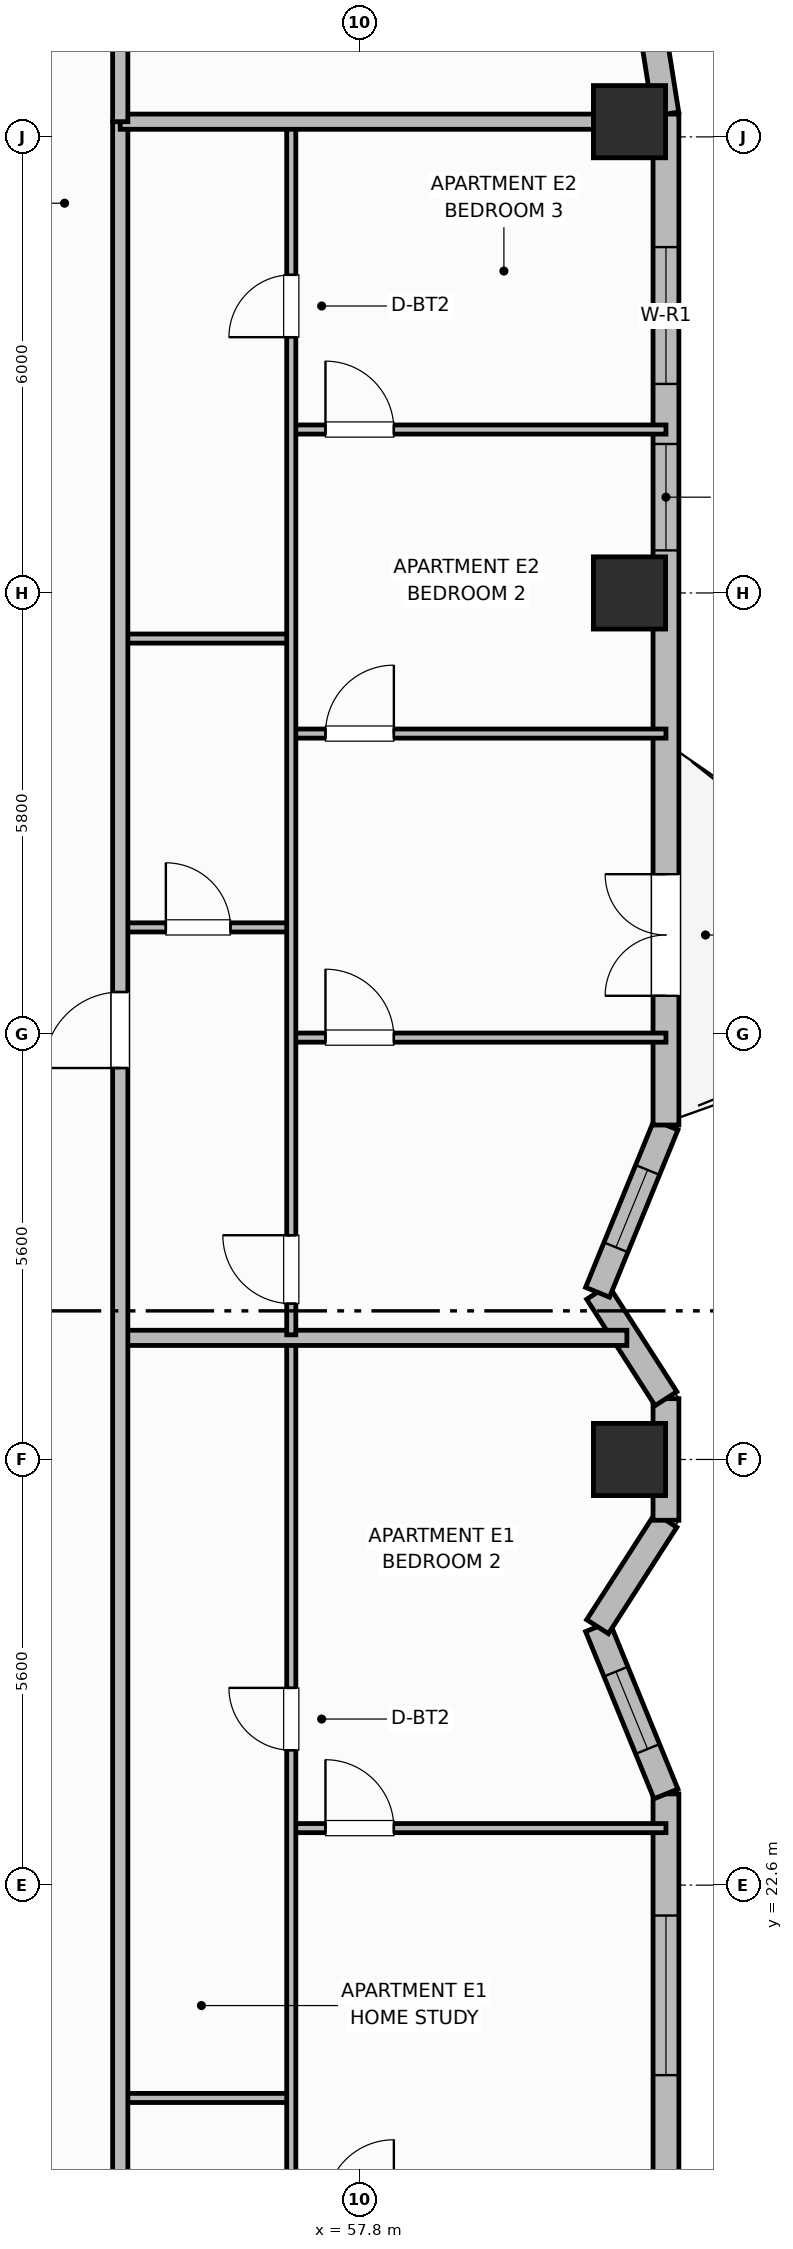
"""IFC4 building model, lengths in metres.
Left out: names, types, materials, properties, quantities, classifications, styles, units other than length and angle.
Written with IfcOpenShell. Run it as: python <this file> out.ifc"""

import sys

from ifc_helpers import new_model, si_unit, direction, frame, frame_2d, origin, origin_2d, place, context, subcontext, project, spatial, rectangle, extrude, element, fill, save


model = new_model("IFC4")
c1 = context("Model", 3, precision=1e-05, world=origin(), true_north=direction((0.0, 1.0)))
c2 = subcontext(c1, "Body", "Model", "MODEL_VIEW")
j1 = project(units=[si_unit("LENGTHUNIT", "METRE"), si_unit("PLANEANGLEUNIT", "RADIAN")], contexts=[c1])
p1 = place(None, origin())
s1 = spatial("IfcSite", under=j1, at=p1, CompositionType="ELEMENT")
p2 = place(p1, origin())
s2 = spatial("IfcBuilding", under=s1, at=p2, CompositionType="ELEMENT")
p3 = place(p2, frame((0.0, 0.0, 155.2)))
s3 = spatial("IfcBuildingStorey", under=s2, at=p3, CompositionType="ELEMENT", Elevation=155.2)
for number, where, z_axis, x_axis in (
    (1, (61.35, 28.2, 0.0), (0.0, 0.0, 1.0), (1.0, 0.0, 0.0)),
    (2, (61.35, 39.6, 0.0), (0.0, 0.0, 1.0), (1.0, 0.0, 0.0)),
    (3, (61.35, 45.8, 0.0), (0.0, 0.0, 1.0), (1.0, 0.0, 0.0)),
):
    element("IfcColumn", number, at=place(p3, frame(where, z_axis=z_axis, x_axis=x_axis)), inside=s3, PredefinedType="COLUMN", context=c2, shape_type="SweptSolid", body=[
        extrude(rectangle(XDim=0.95, YDim=0.95, at=origin_2d()), origin(), (0.0, 0.0, 1.0), 3.7),
    ])
p4 = place(p3, frame((61.83, 10.5, 0.0), z_axis=(0.0, 0.0, 1.0), x_axis=(0.0, 1.0, 0.0)))
e4 = element("IfcWall", 4, at=p4, inside=s3, PredefinedType="SOLIDWALL", context=c2, shape_type="SweptSolid", body=[
    extrude(rectangle(XDim=13.3, YDim=0.34, at=frame_2d((6.65, 0.0))), origin(), (0.0, 0.0, 1.0), 2.72),
])
p5 = place(p4, frame((1.6, 0.0, 0.7)))
e5 = element("IfcOpeningElement", 5, at=p5, cuts=e4, PredefinedType="OPENING", context=c2, shape_type="SweptSolid", body=[
    extrude(rectangle(XDim=2.1, YDim=1.9, at=frame_2d((1.05, 0.95))), frame((0.0, 0.18, 0.0), z_axis=(0.0, -1.0, 0.0), x_axis=(1.0, 0.0, 0.0)), (0.0, 0.0, 1.0), 0.36),
])
p6 = place(p4, frame((9.6, 0.0, 0.7)))
e6 = element("IfcOpeningElement", 6, at=p6, cuts=e4, PredefinedType="OPENING", context=c2, shape_type="SweptSolid", body=[
    extrude(rectangle(XDim=2.1, YDim=1.9, at=frame_2d((1.05, 0.95))), frame((0.0, 0.18, 0.0), z_axis=(0.0, -1.0, 0.0), x_axis=(1.0, 0.0, 0.0)), (0.0, 0.0, 1.0), 0.36),
])
p7 = place(p3, frame((61.83, 23.8, 0.0), z_axis=(0.0, 0.0, 1.0), x_axis=(-0.378692835005, 0.925522412865, 0.0)))
e7 = element("IfcWall", 7, at=p7, inside=s3, PredefinedType="SOLIDWALL", context=c2, shape_type="SweptSolid", body=[
    extrude(rectangle(XDim=2.377, YDim=0.34, at=frame_2d((1.188, 0.0))), origin(), (0.0, 0.0, 1.0), 2.72),
])
p8 = place(p7, frame((0.638, 0.0, 0.91)))
e8 = element("IfcOpeningElement", 8, at=p8, cuts=e7, PredefinedType="OPENING", context=c2, shape_type="SweptSolid", body=[
    extrude(rectangle(XDim=1.1, YDim=1.65, at=frame_2d((0.55, 0.825))), frame((0.0, 0.18, 0.0), z_axis=(0.0, -1.0, 0.0), x_axis=(1.0, 0.0, 0.0)), (0.0, 0.0, 1.0), 0.36),
])
p9 = place(p3, frame((60.93, 26.0, 0.0), z_axis=(0.0, 0.0, 1.0), x_axis=(0.540846555596, 0.841121277403, 0.0)))
e9 = element("IfcWall", 9, at=p9, inside=s3, PredefinedType="SOLIDWALL", context=c2, shape_type="SweptSolid", body=[
    extrude(rectangle(XDim=1.664, YDim=0.34, at=frame_2d((0.832, 0.0))), origin(), (0.0, 0.0, 1.0), 2.72),
])
p10 = place(p3, frame((61.83, 27.4, 0.0), z_axis=(0.0, 0.0, 1.0), x_axis=(0.0, 1.0, 0.0)))
e10 = element("IfcWall", 10, at=p10, inside=s3, PredefinedType="SOLIDWALL", context=c2, shape_type="SweptSolid", body=[
    extrude(rectangle(XDim=1.6, YDim=0.34, at=frame_2d((0.8, 0.0))), origin(), (0.0, 0.0, 1.0), 2.72),
])
p11 = place(p3, frame((61.83, 29.0, 0.0), z_axis=(0.0, 0.0, 1.0), x_axis=(-0.540846555596, 0.841121277403, 0.0)))
e11 = element("IfcWall", 11, at=p11, inside=s3, PredefinedType="SOLIDWALL", context=c2, shape_type="SweptSolid", body=[
    extrude(rectangle(XDim=1.664, YDim=0.34, at=frame_2d((0.832, 0.0))), origin(), (0.0, 0.0, 1.0), 2.72),
])
p12 = place(p3, frame((60.93, 30.4, 0.0), z_axis=(0.0, 0.0, 1.0), x_axis=(0.378656839344, 0.925537140269, 0.0)))
e12 = element("IfcWall", 12, at=p12, inside=s3, PredefinedType="SOLIDWALL", context=c2, shape_type="SweptSolid", body=[
    extrude(rectangle(XDim=2.377, YDim=0.34, at=frame_2d((1.188, 0.0))), origin(), (0.0, 0.0, 1.0), 2.72),
])
p13 = place(p12, frame((0.638, 0.0, 0.91)))
e13 = element("IfcOpeningElement", 13, at=p13, cuts=e12, PredefinedType="OPENING", context=c2, shape_type="SweptSolid", body=[
    extrude(rectangle(XDim=1.1, YDim=1.65, at=frame_2d((0.55, 0.825))), frame((0.0, 0.18, 0.0), z_axis=(0.0, -1.0, 0.0), x_axis=(1.0, 0.0, 0.0)), (0.0, 0.0, 1.0), 0.36),
])
p14 = place(p3, frame((61.83, 32.6, 0.0), z_axis=(0.0, 0.0, 1.0), x_axis=(0.0, 1.0, 0.0)))
e14 = element("IfcWall", 14, at=p14, inside=s3, PredefinedType="SOLIDWALL", context=c2, shape_type="SweptSolid", body=[
    extrude(rectangle(XDim=13.3, YDim=0.34, at=frame_2d((6.65, 0.0))), origin(), (0.0, 0.0, 1.0), 2.72),
])
p15 = place(p14, frame((1.7, 0.0, 0.0)))
e15 = element("IfcOpeningElement", 15, at=p15, cuts=e14, PredefinedType="OPENING", context=c2, shape_type="SweptSolid", body=[
    extrude(rectangle(XDim=1.6, YDim=2.1, at=frame_2d((0.8, 1.05))), frame((0.0, 0.18, 0.0), z_axis=(0.0, -1.0, 0.0), x_axis=(1.0, 0.0, 0.0)), (0.0, 0.0, 1.0), 0.36),
])
p16 = place(p14, frame((7.56, 0.0, 0.71)))
e16 = element("IfcOpeningElement", 16, at=p16, cuts=e14, PredefinedType="OPENING", context=c2, shape_type="SweptSolid", body=[
    extrude(rectangle(XDim=1.4, YDim=1.85, at=frame_2d((0.7, 0.925))), frame((0.0, 0.18, 0.0), z_axis=(0.0, -1.0, 0.0), x_axis=(1.0, 0.0, 0.0)), (0.0, 0.0, 1.0), 0.36),
])
p17 = place(p14, frame((9.75, 0.0, 0.75)))
e17 = element("IfcOpeningElement", 17, at=p17, cuts=e14, PredefinedType="OPENING", context=c2, shape_type="SweptSolid", body=[
    extrude(rectangle(XDim=1.8, YDim=1.85, at=frame_2d((0.9, 0.925))), frame((0.0, 0.18, 0.0), z_axis=(0.0, -1.0, 0.0), x_axis=(1.0, 0.0, 0.0)), (0.0, 0.0, 1.0), 0.36),
])
p18 = place(p3, frame((61.83, 45.9, 0.0), z_axis=(0.0, 0.0, 1.0), x_axis=(-0.156481329164, 0.987680916907, 0.0)))
e18 = element("IfcWall", 18, at=p18, inside=s3, PredefinedType="SOLIDWALL", context=c2, shape_type="SweptSolid", body=[
    extrude(rectangle(XDim=1.136, YDim=0.34, at=frame_2d((0.568, 0.0))), origin(), (0.0, 0.0, 1.0), 2.72),
])
p19 = place(p3, frame((54.65, 19.8, 0.0), z_axis=(0.0, 0.0, 1.0), x_axis=(1.0, 0.0, 0.0)))
e19 = element("IfcWall", 19, at=p19, inside=s3, PredefinedType="PARTITIONING", context=c2, shape_type="SweptSolid", body=[
    extrude(rectangle(XDim=2.25, YDim=0.12, at=frame_2d((1.125, 0.0))), origin(), (0.0, 0.0, 1.0), 2.55),
])
p20 = place(p3, frame((56.9, 23.35, 0.0), z_axis=(0.0, 0.0, 1.0), x_axis=(1.0, 0.0, 0.0)))
e20 = element("IfcWall", 20, at=p20, inside=s3, PredefinedType="PARTITIONING", context=c2, shape_type="SweptSolid", body=[
    extrude(rectangle(XDim=4.93, YDim=0.12, at=frame_2d((2.465, 0.0))), origin(), (0.0, 0.0, 1.0), 2.55),
])
p21 = place(p20, frame((0.45, 0.0, 0.0)))
e21 = element("IfcOpeningElement", 21, at=p21, cuts=e20, PredefinedType="OPENING", context=c2, shape_type="SweptSolid", body=[
    extrude(rectangle(XDim=0.9, YDim=2.1, at=frame_2d((0.45, 1.05))), frame((0.0, 0.07, 0.0), z_axis=(0.0, -1.0, 0.0), x_axis=(1.0, 0.0, 0.0)), (0.0, 0.0, 1.0), 0.14),
])
p22 = place(p3, frame((56.9, 10.64, 0.0), z_axis=(0.0, 0.0, 1.0), x_axis=(0.0, 1.0, 0.0)))
e22 = element("IfcWall", 22, at=p22, inside=s3, PredefinedType="PARTITIONING", context=c2, shape_type="SweptSolid", body=[
    extrude(rectangle(XDim=19.12, YDim=0.12, at=frame_2d((9.56, 0.0))), origin(), (0.0, 0.0, 1.0), 2.55),
])
p23 = place(p22, frame((0.41, 0.0, 0.0)))
e23 = element("IfcOpeningElement", 23, at=p23, cuts=e22, PredefinedType="OPENING", context=c2, shape_type="SweptSolid", body=[
    extrude(rectangle(XDim=0.9, YDim=2.1, at=frame_2d((0.45, 1.05))), frame((0.0, 0.07, 0.0), z_axis=(0.0, -1.0, 0.0), x_axis=(1.0, 0.0, 0.0)), (0.0, 0.0, 1.0), 0.14),
])
p24 = place(p22, frame((13.735, 0.0, 0.0)))
e24 = element("IfcOpeningElement", 24, at=p24, cuts=e22, PredefinedType="OPENING", context=c2, shape_type="SweptSolid", body=[
    extrude(rectangle(XDim=0.82, YDim=2.08, at=frame_2d((0.41, 1.04))), frame((0.0, 0.07, 0.0), z_axis=(0.0, -1.0, 0.0), x_axis=(1.0, 0.0, 0.0)), (0.0, 0.0, 1.0), 0.14),
])
p25 = place(p3, frame((54.65, 29.8, 0.0), z_axis=(0.0, 0.0, 1.0), x_axis=(1.0, 0.0, 0.0)))
e25 = element("IfcWall", 25, at=p25, inside=s3, PredefinedType="PARTITIONING", context=c2, shape_type="SweptSolid", body=[
    extrude(rectangle(XDim=6.666, YDim=0.2, at=frame_2d((3.333, 0.0))), origin(), (0.0, 0.0, 1.0), 2.55),
])
p26 = place(p3, frame((54.65, 35.2, 0.0), z_axis=(0.0, 0.0, 1.0), x_axis=(1.0, 0.0, 0.0)))
e26 = element("IfcWall", 26, at=p26, inside=s3, PredefinedType="PARTITIONING", context=c2, shape_type="SweptSolid", body=[
    extrude(rectangle(XDim=2.25, YDim=0.12, at=frame_2d((1.125, 0.0))), origin(), (0.0, 0.0, 1.0), 2.55),
])
p27 = place(p26, frame((0.6, 0.0, 0.0)))
e27 = element("IfcOpeningElement", 27, at=p27, cuts=e26, PredefinedType="OPENING", context=c2, shape_type="SweptSolid", body=[
    extrude(rectangle(XDim=0.85, YDim=2.1, at=frame_2d((0.425, 1.05))), frame((0.0, 0.07, 0.0), z_axis=(0.0, -1.0, 0.0), x_axis=(1.0, 0.0, 0.0)), (0.0, 0.0, 1.0), 0.14),
])
p28 = place(p3, frame((54.65, 39.0, 0.0), z_axis=(0.0, 0.0, 1.0), x_axis=(1.0, 0.0, 0.0)))
e28 = element("IfcWall", 28, at=p28, inside=s3, PredefinedType="PARTITIONING", context=c2, shape_type="SweptSolid", body=[
    extrude(rectangle(XDim=2.25, YDim=0.12, at=frame_2d((1.125, 0.0))), origin(), (0.0, 0.0, 1.0), 2.55),
])
p29 = place(p3, frame((56.9, 33.75, 0.0), z_axis=(0.0, 0.0, 1.0), x_axis=(1.0, 0.0, 0.0)))
e29 = element("IfcWall", 29, at=p29, inside=s3, PredefinedType="PARTITIONING", context=c2, shape_type="SweptSolid", body=[
    extrude(rectangle(XDim=4.93, YDim=0.12, at=frame_2d((2.465, 0.0))), origin(), (0.0, 0.0, 1.0), 2.55),
])
p30 = place(p29, frame((0.45, 0.0, 0.0)))
e30 = element("IfcOpeningElement", 30, at=p30, cuts=e29, PredefinedType="OPENING", context=c2, shape_type="SweptSolid", body=[
    extrude(rectangle(XDim=0.9, YDim=2.1, at=frame_2d((0.45, 1.05))), frame((0.0, 0.07, 0.0), z_axis=(0.0, -1.0, 0.0), x_axis=(1.0, 0.0, 0.0)), (0.0, 0.0, 1.0), 0.14),
])
p31 = place(p3, frame((56.9, 37.75, 0.0), z_axis=(0.0, 0.0, 1.0), x_axis=(1.0, 0.0, 0.0)))
e31 = element("IfcWall", 31, at=p31, inside=s3, PredefinedType="PARTITIONING", context=c2, shape_type="SweptSolid", body=[
    extrude(rectangle(XDim=4.93, YDim=0.12, at=frame_2d((2.465, 0.0))), origin(), (0.0, 0.0, 1.0), 2.55),
])
p32 = place(p31, frame((0.45, 0.0, 0.0)))
e32 = element("IfcOpeningElement", 32, at=p32, cuts=e31, PredefinedType="OPENING", context=c2, shape_type="SweptSolid", body=[
    extrude(rectangle(XDim=0.9, YDim=2.1, at=frame_2d((0.45, 1.05))), frame((0.0, 0.07, 0.0), z_axis=(0.0, -1.0, 0.0), x_axis=(1.0, 0.0, 0.0)), (0.0, 0.0, 1.0), 0.14),
])
p33 = place(p3, frame((56.9, 41.75, 0.0), z_axis=(0.0, 0.0, 1.0), x_axis=(1.0, 0.0, 0.0)))
e33 = element("IfcWall", 33, at=p33, inside=s3, PredefinedType="PARTITIONING", context=c2, shape_type="SweptSolid", body=[
    extrude(rectangle(XDim=4.93, YDim=0.12, at=frame_2d((2.465, 0.0))), origin(), (0.0, 0.0, 1.0), 2.55),
])
p34 = place(p33, frame((0.45, 0.0, 0.0)))
e34 = element("IfcOpeningElement", 34, at=p34, cuts=e33, PredefinedType="OPENING", context=c2, shape_type="SweptSolid", body=[
    extrude(rectangle(XDim=0.9, YDim=2.1, at=frame_2d((0.45, 1.05))), frame((0.0, 0.07, 0.0), z_axis=(0.0, -1.0, 0.0), x_axis=(1.0, 0.0, 0.0)), (0.0, 0.0, 1.0), 0.14),
])
p35 = place(p3, frame((56.9, 29.84, 0.0), z_axis=(0.0, 0.0, 1.0), x_axis=(0.0, 1.0, 0.0)))
e35 = element("IfcWall", 35, at=p35, inside=s3, PredefinedType="PARTITIONING", context=c2, shape_type="SweptSolid", body=[
    extrude(rectangle(XDim=15.92, YDim=0.12, at=frame_2d((7.96, 0.0))), origin(), (0.0, 0.0, 1.0), 2.55),
])
p36 = place(p35, frame((0.41, 0.0, 0.0)))
e36 = element("IfcOpeningElement", 36, at=p36, cuts=e35, PredefinedType="OPENING", context=c2, shape_type="SweptSolid", body=[
    extrude(rectangle(XDim=0.9, YDim=2.1, at=frame_2d((0.45, 1.05))), frame((0.0, 0.07, 0.0), z_axis=(0.0, -1.0, 0.0), x_axis=(1.0, 0.0, 0.0)), (0.0, 0.0, 1.0), 0.14),
])
p37 = place(p35, frame((13.125, 0.0, 0.0)))
e37 = element("IfcOpeningElement", 37, at=p37, cuts=e35, PredefinedType="OPENING", context=c2, shape_type="SweptSolid", body=[
    extrude(rectangle(XDim=0.82, YDim=2.08, at=frame_2d((0.41, 1.04))), frame((0.0, 0.07, 0.0), z_axis=(0.0, -1.0, 0.0), x_axis=(1.0, 0.0, 0.0)), (0.0, 0.0, 1.0), 0.14),
])
p38 = place(p3, frame((54.65, 10.6, 0.0), z_axis=(0.0, 0.0, 1.0), x_axis=(0.0, 1.0, 0.0)))
e38 = element("IfcWall", 38, at=p38, inside=s3, PredefinedType="PARTITIONING", context=c2, shape_type="SweptSolid", body=[
    extrude(rectangle(XDim=35.2, YDim=0.2, at=frame_2d((17.6, 0.0))), origin(), (0.0, 0.0, 1.0), 2.55),
])
p39 = place(p38, frame((2.65, 0.0, 0.0)))
e39 = element("IfcOpeningElement", 39, at=p39, cuts=e38, PredefinedType="OPENING", context=c2, shape_type="SweptSolid", body=[
    extrude(rectangle(XDim=1.0, YDim=2.15, at=frame_2d((0.5, 1.075))), frame((0.0, 0.11, 0.0), z_axis=(0.0, -1.0, 0.0), x_axis=(1.0, 0.0, 0.0)), (0.0, 0.0, 1.0), 0.22),
])
p40 = place(p38, frame((22.75, 0.0, 0.0)))
e40 = element("IfcOpeningElement", 40, at=p40, cuts=e38, PredefinedType="OPENING", context=c2, shape_type="SweptSolid", body=[
    extrude(rectangle(XDim=1.0, YDim=2.15, at=frame_2d((0.5, 1.075))), frame((0.0, 0.11, 0.0), z_axis=(0.0, -1.0, 0.0), x_axis=(1.0, 0.0, 0.0)), (0.0, 0.0, 1.0), 0.22),
])
p41 = place(p3, frame((54.65, 45.8, 0.0), z_axis=(0.0, 0.0, 1.0), x_axis=(1.0, 0.0, 0.0)))
e41 = element("IfcWall", 41, at=p41, inside=s3, PredefinedType="PARTITIONING", context=c2, shape_type="SweptSolid", body=[
    extrude(rectangle(XDim=6.76, YDim=0.2, at=frame_2d((3.38, 0.0))), origin(), (0.0, 0.0, 1.0), 2.55),
])
p42 = place(p3, frame((54.65, 45.8, 0.0), z_axis=(0.0, 0.0, 1.0), x_axis=(0.0, 1.0, 0.0)))
e42 = element("IfcWall", 42, at=p42, inside=s3, PredefinedType="PARTITIONING", context=c2, shape_type="SweptSolid", body=[
    extrude(rectangle(XDim=3.73, YDim=0.2, at=frame_2d((1.865, 0.0))), origin(), (0.0, 0.0, 1.0), 2.55),
])
p43 = place(p6, origin())
e43 = element("IfcWindow", 43, at=p43, inside=s3, PartitioningType="SINGLE_PANEL", PredefinedType="WINDOW", context=c2, shape_type="SweptSolid", body=[
    extrude(rectangle(XDim=2.1, YDim=1.9, at=frame_2d((1.05, 0.95))), frame((0.0, 0.03, 0.0), z_axis=(0.0, -1.0, 0.0), x_axis=(1.0, 0.0, 0.0)), (0.0, 0.0, 1.0), 0.06),
])
fill(e6, e43)
p44 = place(p8, origin())
e44 = element("IfcWindow", 44, at=p44, inside=s3, PartitioningType="SINGLE_PANEL", PredefinedType="WINDOW", context=c2, shape_type="SweptSolid", body=[
    extrude(rectangle(XDim=1.1, YDim=1.65, at=frame_2d((0.55, 0.825))), frame((0.0, 0.03, 0.0), z_axis=(0.0, -1.0, 0.0), x_axis=(1.0, 0.0, 0.0)), (0.0, 0.0, 1.0), 0.06),
])
fill(e8, e44)
p45 = place(p13, origin())
e45 = element("IfcWindow", 45, at=p45, inside=s3, PartitioningType="SINGLE_PANEL", PredefinedType="WINDOW", context=c2, shape_type="SweptSolid", body=[
    extrude(rectangle(XDim=1.1, YDim=1.65, at=frame_2d((0.55, 0.825))), frame((0.0, 0.03, 0.0), z_axis=(0.0, -1.0, 0.0), x_axis=(1.0, 0.0, 0.0)), (0.0, 0.0, 1.0), 0.06),
])
fill(e13, e45)
p46 = place(p15, origin())
e46 = element("IfcDoor", 46, at=p46, inside=s3, OperationType="DOUBLE_DOOR_SINGLE_SWING", PredefinedType="DOOR", context=c2, shape_type="SweptSolid", body=[
    extrude(rectangle(XDim=1.6, YDim=2.1, at=frame_2d((0.8, 1.05))), frame((0.0, 0.025, 0.0), z_axis=(0.0, -1.0, 0.0), x_axis=(1.0, 0.0, 0.0)), (0.0, 0.0, 1.0), 0.05),
])
fill(e15, e46)
p47 = place(p16, origin())
e47 = element("IfcWindow", 47, at=p47, inside=s3, PartitioningType="SINGLE_PANEL", PredefinedType="WINDOW", context=c2, shape_type="SweptSolid", body=[
    extrude(rectangle(XDim=1.4, YDim=1.85, at=frame_2d((0.7, 0.925))), frame((0.0, 0.03, 0.0), z_axis=(0.0, -1.0, 0.0), x_axis=(1.0, 0.0, 0.0)), (0.0, 0.0, 1.0), 0.06),
])
fill(e16, e47)
p48 = place(p17, origin())
e48 = element("IfcWindow", 48, at=p48, inside=s3, PartitioningType="SINGLE_PANEL", PredefinedType="WINDOW", context=c2, shape_type="SweptSolid", body=[
    extrude(rectangle(XDim=1.8, YDim=1.85, at=frame_2d((0.9, 0.925))), frame((0.0, 0.03, 0.0), z_axis=(0.0, -1.0, 0.0), x_axis=(1.0, 0.0, 0.0)), (0.0, 0.0, 1.0), 0.06),
])
fill(e17, e48)
p49 = place(p21, origin())
e49 = element("IfcDoor", 49, at=p49, inside=s3, OperationType="SINGLE_SWING_LEFT", PredefinedType="DOOR", context=c2, shape_type="SweptSolid", body=[
    extrude(rectangle(XDim=0.9, YDim=2.1, at=frame_2d((0.45, 1.05))), frame((0.0, 0.025, 0.0), z_axis=(0.0, -1.0, 0.0), x_axis=(1.0, 0.0, 0.0)), (0.0, 0.0, 1.0), 0.05),
])
fill(e21, e49)
p50 = place(p24, origin())
e50 = element("IfcDoor", 50, at=p50, inside=s3, OperationType="SINGLE_SWING_RIGHT", PredefinedType="DOOR", context=c2, shape_type="SweptSolid", body=[
    extrude(rectangle(XDim=0.82, YDim=2.08, at=frame_2d((0.41, 1.04))), frame((0.0, 0.025, 0.0), z_axis=(0.0, -1.0, 0.0), x_axis=(1.0, 0.0, 0.0)), (0.0, 0.0, 1.0), 0.05),
])
fill(e24, e50)
p51 = place(p27, origin())
e51 = element("IfcDoor", 51, at=p51, inside=s3, OperationType="SINGLE_SWING_LEFT", PredefinedType="DOOR", context=c2, shape_type="SweptSolid", body=[
    extrude(rectangle(XDim=0.85, YDim=2.1, at=frame_2d((0.425, 1.05))), frame((0.0, 0.025, 0.0), z_axis=(0.0, -1.0, 0.0), x_axis=(1.0, 0.0, 0.0)), (0.0, 0.0, 1.0), 0.05),
])
fill(e27, e51)
p52 = place(p30, origin())
e52 = element("IfcDoor", 52, at=p52, inside=s3, OperationType="SINGLE_SWING_LEFT", PredefinedType="DOOR", context=c2, shape_type="SweptSolid", body=[
    extrude(rectangle(XDim=0.9, YDim=2.1, at=frame_2d((0.45, 1.05))), frame((0.0, 0.025, 0.0), z_axis=(0.0, -1.0, 0.0), x_axis=(1.0, 0.0, 0.0)), (0.0, 0.0, 1.0), 0.05),
])
fill(e30, e52)
p53 = place(p32, origin())
e53 = element("IfcDoor", 53, at=p53, inside=s3, OperationType="SINGLE_SWING_RIGHT", PredefinedType="DOOR", context=c2, shape_type="SweptSolid", body=[
    extrude(rectangle(XDim=0.9, YDim=2.1, at=frame_2d((0.45, 1.05))), frame((0.0, 0.025, 0.0), z_axis=(0.0, -1.0, 0.0), x_axis=(1.0, 0.0, 0.0)), (0.0, 0.0, 1.0), 0.05),
])
fill(e32, e53)
p54 = place(p34, origin())
e54 = element("IfcDoor", 54, at=p54, inside=s3, OperationType="SINGLE_SWING_LEFT", PredefinedType="DOOR", context=c2, shape_type="SweptSolid", body=[
    extrude(rectangle(XDim=0.9, YDim=2.1, at=frame_2d((0.45, 1.05))), frame((0.0, 0.025, 0.0), z_axis=(0.0, -1.0, 0.0), x_axis=(1.0, 0.0, 0.0)), (0.0, 0.0, 1.0), 0.05),
])
fill(e34, e54)
p55 = place(p36, origin())
e55 = element("IfcDoor", 55, at=p55, inside=s3, OperationType="SINGLE_SWING_RIGHT", PredefinedType="DOOR", context=c2, shape_type="SweptSolid", body=[
    extrude(rectangle(XDim=0.9, YDim=2.1, at=frame_2d((0.45, 1.05))), frame((0.0, 0.025, 0.0), z_axis=(0.0, -1.0, 0.0), x_axis=(1.0, 0.0, 0.0)), (0.0, 0.0, 1.0), 0.05),
])
fill(e36, e55)
p56 = place(p37, origin())
e56 = element("IfcDoor", 56, at=p56, inside=s3, OperationType="SINGLE_SWING_LEFT", PredefinedType="DOOR", context=c2, shape_type="SweptSolid", body=[
    extrude(rectangle(XDim=0.82, YDim=2.08, at=frame_2d((0.41, 1.04))), frame((0.0, 0.025, 0.0), z_axis=(0.0, -1.0, 0.0), x_axis=(1.0, 0.0, 0.0)), (0.0, 0.0, 1.0), 0.05),
])
fill(e37, e56)
p57 = place(p40, origin())
e57 = element("IfcDoor", 57, at=p57, inside=s3, OperationType="SINGLE_SWING_LEFT", PredefinedType="DOOR", context=c2, shape_type="SweptSolid", body=[
    extrude(rectangle(XDim=1.0, YDim=2.15, at=frame_2d((0.5, 1.075))), frame((0.0, 0.025, 0.0), z_axis=(0.0, -1.0, 0.0), x_axis=(1.0, 0.0, 0.0)), (0.0, 0.0, 1.0), 0.05),
])
fill(e40, e57)
save(model, sys.argv[1])
